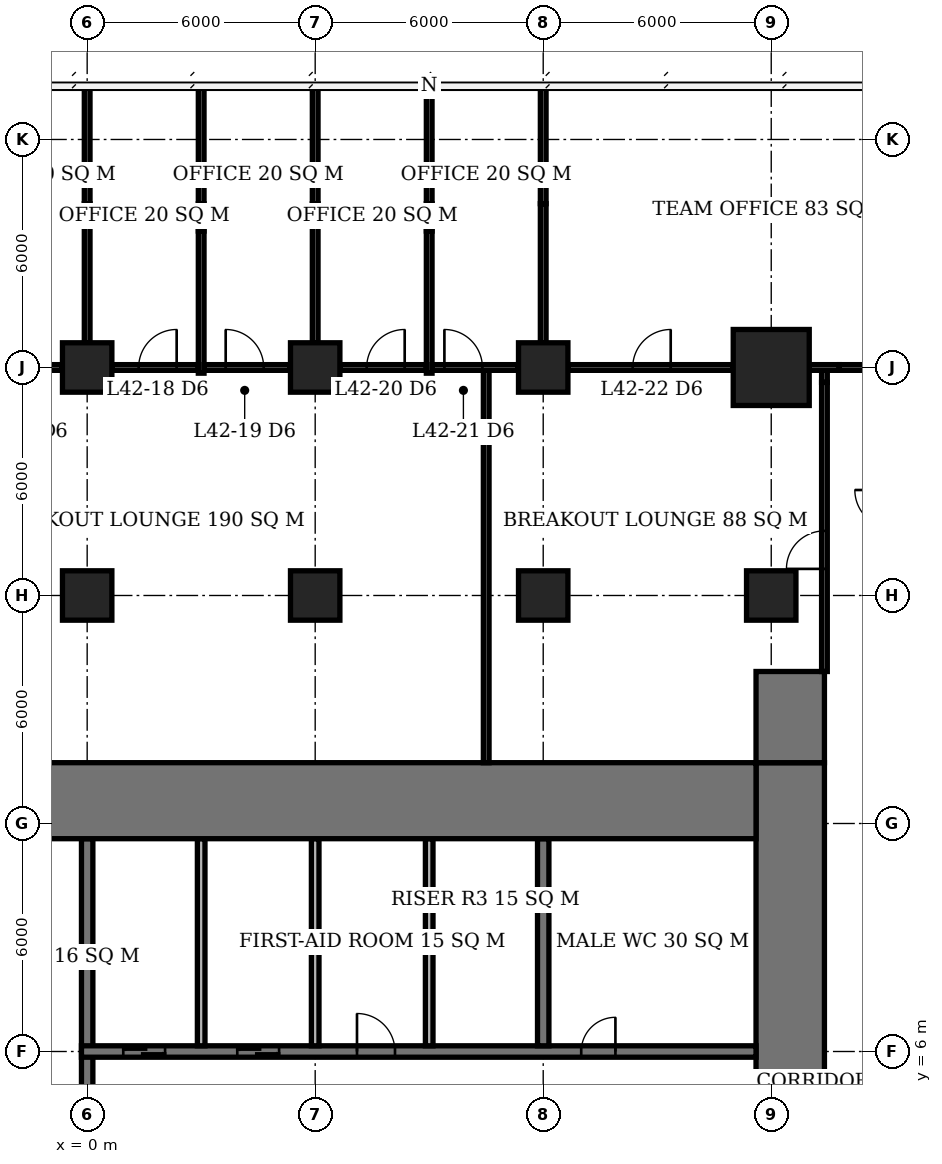
"""IFC4 building model, lengths in metres.
Left out: names, types, materials, properties, quantities, classifications, styles, units other than length and angle.
Written with IfcOpenShell. Run it as: python <this file> out.ifc"""

import sys

from ifc_helpers import new_model, si_unit, direction, frame, frame_2d, origin, origin_2d, place, context, subcontext, project, spatial, rectangle, extrude, element, fill, save


model = new_model("IFC4")
c1 = context("Model", 3, precision=1e-05, world=origin(), true_north=direction((0.0, 1.0)))
c2 = subcontext(c1, "Body", "Model", "MODEL_VIEW")
j1 = project(units=[si_unit("LENGTHUNIT", "METRE"), si_unit("PLANEANGLEUNIT", "RADIAN")], contexts=[c1])
p1 = place(None, origin())
s1 = spatial("IfcSite", under=j1, at=p1, CompositionType="ELEMENT")
p2 = place(p1, origin())
s2 = spatial("IfcBuilding", under=s1, at=p2, CompositionType="ELEMENT")
p3 = place(p2, frame((0.0, 0.0, 173.3)))
s3 = spatial("IfcBuildingStorey", under=s2, at=p3, CompositionType="ELEMENT", Elevation=173.3)
for number, where, z_axis, x_axis in (
    (1, (0.0, 18.0, 0.0), (0.0, 0.0, 1.0), (1.0, 0.0, 0.0)),
    (2, (0.0, 24.0, 0.0), (0.0, 0.0, 1.0), (1.0, 0.0, 0.0)),
    (3, (6.0, 18.0, 0.0), (0.0, 0.0, 1.0), (1.0, 0.0, 0.0)),
    (4, (6.0, 24.0, 0.0), (0.0, 0.0, 1.0), (1.0, 0.0, 0.0)),
    (5, (12.0, 18.0, 0.0), (0.0, 0.0, 1.0), (1.0, 0.0, 0.0)),
    (6, (12.0, 24.0, 0.0), (0.0, 0.0, 1.0), (1.0, 0.0, 0.0)),
    (7, (18.0, 18.0, 0.0), (0.0, 0.0, 1.0), (1.0, 0.0, 0.0)),
):
    element("IfcColumn", number, at=place(p3, frame(where, z_axis=z_axis, x_axis=x_axis)), inside=s3, PredefinedType="COLUMN", context=c2, shape_type="SweptSolid", body=[
        extrude(rectangle(XDim=1.3, YDim=1.3, at=origin_2d()), origin(), (0.0, 0.0, 1.0), 3.9),
    ])
p4 = place(p3, frame((18.0, 24.0, 0.0), z_axis=(0.0, 0.0, 1.0), x_axis=(1.0, 0.0, 0.0)))
e8 = element("IfcColumn", 8, at=p4, inside=s3, PredefinedType="COLUMN", context=c2, shape_type="SweptSolid", body=[
    extrude(rectangle(XDim=2.0, YDim=2.0, at=origin_2d()), origin(), (0.0, 0.0, 1.0), 3.9),
])
p5 = place(p3, frame((-5.6, 12.6, 0.0), z_axis=(0.0, 0.0, 1.0), x_axis=(1.0, 0.0, 0.0)))
e9 = element("IfcWall", 9, at=p5, inside=s3, PredefinedType="SHEAR", context=c2, shape_type="SweptSolid", body=[
    extrude(rectangle(XDim=23.2, YDim=2.0, at=frame_2d((11.6, 0.0))), origin(), (0.0, 0.0, 1.0), 3.9),
])
p6 = place(p3, frame((18.5, -7.6, 0.0), z_axis=(0.0, 0.0, 1.0), x_axis=(0.0, 1.0, 0.0)))
e10 = element("IfcWall", 10, at=p6, inside=s3, PredefinedType="SHEAR", context=c2, shape_type="SweptSolid", body=[
    extrude(rectangle(XDim=21.2, YDim=1.8, at=frame_2d((10.6, 0.0))), origin(), (0.0, 0.0, 1.0), 3.9),
])
p7 = place(p6, frame((9.2, 0.0, 0.0)))
e11 = element("IfcOpeningElement", 11, at=p7, cuts=e10, PredefinedType="OPENING", context=c2, shape_type="SweptSolid", body=[
    extrude(rectangle(XDim=1.8, YDim=2.4, at=frame_2d((0.9, 1.2))), frame((0.0, 0.91, 0.0), z_axis=(0.0, -1.0, 0.0), x_axis=(1.0, 0.0, 0.0)), (0.0, 0.0, 1.0), 1.82),
])
p8 = place(p3, frame((18.5, 13.6, 0.0), z_axis=(0.0, 0.0, 1.0), x_axis=(0.0, 1.0, 0.0)))
e12 = element("IfcWall", 12, at=p8, inside=s3, PredefinedType="SHEAR", context=c2, shape_type="SweptSolid", body=[
    extrude(rectangle(XDim=2.4, YDim=1.8, at=frame_2d((1.2, 0.0))), origin(), (0.0, 0.0, 1.0), 3.9),
])
p9 = place(p3, frame((-0.15, 6.0, 0.0), z_axis=(0.0, 0.0, 1.0), x_axis=(1.0, 0.0, 0.0)))
e13 = element("IfcWall", 13, at=p9, inside=s3, PredefinedType="SHEAR", context=c2, shape_type="SweptSolid", body=[
    extrude(rectangle(XDim=17.75, YDim=0.3, at=frame_2d((8.875, 0.0))), origin(), (0.0, 0.0, 1.0), 3.9),
])
p10 = place(p9, frame((13.15, 0.0, 0.0)))
e14 = element("IfcOpeningElement", 14, at=p10, cuts=e13, PredefinedType="OPENING", context=c2, shape_type="SweptSolid", body=[
    extrude(rectangle(XDim=0.9, YDim=2.1, at=frame_2d((0.45, 1.05))), frame((0.0, 0.16, 0.0), z_axis=(0.0, -1.0, 0.0), x_axis=(1.0, 0.0, 0.0)), (0.0, 0.0, 1.0), 0.32),
])
p11 = place(p9, frame((7.25, 0.0, 0.0)))
e15 = element("IfcOpeningElement", 15, at=p11, cuts=e13, PredefinedType="OPENING", context=c2, shape_type="SweptSolid", body=[
    extrude(rectangle(XDim=1.0, YDim=2.1, at=frame_2d((0.5, 1.05))), frame((0.0, 0.16, 0.0), z_axis=(0.0, -1.0, 0.0), x_axis=(1.0, 0.0, 0.0)), (0.0, 0.0, 1.0), 0.32),
])
p12 = place(p9, frame((1.1, 0.0, 0.0)))
e16 = element("IfcOpeningElement", 16, at=p12, cuts=e13, PredefinedType="OPENING", context=c2, shape_type="SweptSolid", body=[
    extrude(rectangle(XDim=1.1, YDim=2.1, at=frame_2d((0.55, 1.05))), frame((0.0, 0.16, 0.0), z_axis=(0.0, -1.0, 0.0), x_axis=(1.0, 0.0, 0.0)), (0.0, 0.0, 1.0), 0.32),
])
p13 = place(p9, frame((4.1, 0.0, 0.0)))
e17 = element("IfcOpeningElement", 17, at=p13, cuts=e13, PredefinedType="OPENING", context=c2, shape_type="SweptSolid", body=[
    extrude(rectangle(XDim=1.1, YDim=2.1, at=frame_2d((0.55, 1.05))), frame((0.0, 0.16, 0.0), z_axis=(0.0, -1.0, 0.0), x_axis=(1.0, 0.0, 0.0)), (0.0, 0.0, 1.0), 0.32),
])
p14 = place(p3, frame((0.0, 3.15, 0.0), z_axis=(0.0, 0.0, 1.0), x_axis=(0.0, 1.0, 0.0)))
e18 = element("IfcWall", 18, at=p14, inside=s3, PredefinedType="SHEAR", context=c2, shape_type="SweptSolid", body=[
    extrude(rectangle(XDim=8.45, YDim=0.3, at=frame_2d((4.225, 0.0))), origin(), (0.0, 0.0, 1.0), 3.9),
])
p15 = place(p3, frame((12.0, 6.15, 0.0), z_axis=(0.0, 0.0, 1.0), x_axis=(0.0, 1.0, 0.0)))
e19 = element("IfcWall", 19, at=p15, inside=s3, PredefinedType="SHEAR", context=c2, shape_type="SweptSolid", body=[
    extrude(rectangle(XDim=5.45, YDim=0.3, at=frame_2d((2.725, 0.0))), origin(), (0.0, 0.0, 1.0), 3.9),
])
for number, where, z_axis, x_axis in (
    (20, (3.0, 6.15, 0.0), (0.0, 0.0, 1.0), (0.0, 1.0, 0.0)),
    (21, (6.0, 6.15, 0.0), (0.0, 0.0, 1.0), (0.0, 1.0, 0.0)),
    (22, (9.0, 6.15, 0.0), (0.0, 0.0, 1.0), (0.0, 1.0, 0.0)),
):
    element("IfcWall", number, at=place(p3, frame(where, z_axis=z_axis, x_axis=x_axis)), inside=s3, PredefinedType="SOLIDWALL", context=c2, shape_type="SweptSolid", body=[
        extrude(rectangle(XDim=5.45, YDim=0.2, at=frame_2d((2.725, 0.0))), origin(), (0.0, 0.0, 1.0), 3.9),
    ])
p16 = place(p3, frame((-2.925, 24.0, 0.0), z_axis=(0.0, 0.0, 1.0), x_axis=(1.0, 0.0, 0.0)))
e23 = element("IfcWall", 23, at=p16, inside=s3, PredefinedType="PARTITIONING", context=c2, shape_type="SweptSolid", body=[
    extrude(rectangle(XDim=2.265, YDim=0.15, at=frame_2d((1.133, 0.0))), origin(), (0.0, 0.0, 1.0), 3.65),
])
p17 = place(p16, frame((0.57, 0.0, 0.0)))
e24 = element("IfcOpeningElement", 24, at=p17, cuts=e23, PredefinedType="OPENING", context=c2, shape_type="SweptSolid", body=[
    extrude(rectangle(XDim=1.0, YDim=2.1, at=frame_2d((0.5, 1.05))), frame((0.0, 0.085, 0.0), z_axis=(0.0, -1.0, 0.0), x_axis=(1.0, 0.0, 0.0)), (0.0, 0.0, 1.0), 0.17),
])
p18 = place(p3, frame((0.66, 24.0, 0.0), z_axis=(0.0, 0.0, 1.0), x_axis=(1.0, 0.0, 0.0)))
e25 = element("IfcWall", 25, at=p18, inside=s3, PredefinedType="PARTITIONING", context=c2, shape_type="SweptSolid", body=[
    extrude(rectangle(XDim=2.265, YDim=0.15, at=frame_2d((1.133, 0.0))), origin(), (0.0, 0.0, 1.0), 3.65),
])
p19 = place(p18, frame((0.695, 0.0, 0.0)))
e26 = element("IfcOpeningElement", 26, at=p19, cuts=e25, PredefinedType="OPENING", context=c2, shape_type="SweptSolid", body=[
    extrude(rectangle(XDim=1.0, YDim=2.1, at=frame_2d((0.5, 1.05))), frame((0.0, 0.085, 0.0), z_axis=(0.0, -1.0, 0.0), x_axis=(1.0, 0.0, 0.0)), (0.0, 0.0, 1.0), 0.17),
])
p20 = place(p3, frame((3.075, 24.0, 0.0), z_axis=(0.0, 0.0, 1.0), x_axis=(1.0, 0.0, 0.0)))
e27 = element("IfcWall", 27, at=p20, inside=s3, PredefinedType="PARTITIONING", context=c2, shape_type="SweptSolid", body=[
    extrude(rectangle(XDim=2.265, YDim=0.15, at=frame_2d((1.133, 0.0))), origin(), (0.0, 0.0, 1.0), 3.65),
])
p21 = place(p20, frame((0.57, 0.0, 0.0)))
e28 = element("IfcOpeningElement", 28, at=p21, cuts=e27, PredefinedType="OPENING", context=c2, shape_type="SweptSolid", body=[
    extrude(rectangle(XDim=1.0, YDim=2.1, at=frame_2d((0.5, 1.05))), frame((0.0, 0.085, 0.0), z_axis=(0.0, -1.0, 0.0), x_axis=(1.0, 0.0, 0.0)), (0.0, 0.0, 1.0), 0.17),
])
p22 = place(p3, frame((6.66, 24.0, 0.0), z_axis=(0.0, 0.0, 1.0), x_axis=(1.0, 0.0, 0.0)))
e29 = element("IfcWall", 29, at=p22, inside=s3, PredefinedType="PARTITIONING", context=c2, shape_type="SweptSolid", body=[
    extrude(rectangle(XDim=2.265, YDim=0.15, at=frame_2d((1.133, 0.0))), origin(), (0.0, 0.0, 1.0), 3.65),
])
p23 = place(p22, frame((0.695, 0.0, 0.0)))
e30 = element("IfcOpeningElement", 30, at=p23, cuts=e29, PredefinedType="OPENING", context=c2, shape_type="SweptSolid", body=[
    extrude(rectangle(XDim=1.0, YDim=2.1, at=frame_2d((0.5, 1.05))), frame((0.0, 0.085, 0.0), z_axis=(0.0, -1.0, 0.0), x_axis=(1.0, 0.0, 0.0)), (0.0, 0.0, 1.0), 0.17),
])
p24 = place(p3, frame((9.075, 24.0, 0.0), z_axis=(0.0, 0.0, 1.0), x_axis=(1.0, 0.0, 0.0)))
e31 = element("IfcWall", 31, at=p24, inside=s3, PredefinedType="PARTITIONING", context=c2, shape_type="SweptSolid", body=[
    extrude(rectangle(XDim=2.265, YDim=0.15, at=frame_2d((1.133, 0.0))), origin(), (0.0, 0.0, 1.0), 3.65),
])
p25 = place(p24, frame((0.325, 0.0, 0.0)))
e32 = element("IfcOpeningElement", 32, at=p25, cuts=e31, PredefinedType="OPENING", context=c2, shape_type="SweptSolid", body=[
    extrude(rectangle(XDim=1.0, YDim=2.1, at=frame_2d((0.5, 1.05))), frame((0.0, 0.085, 0.0), z_axis=(0.0, -1.0, 0.0), x_axis=(1.0, 0.0, 0.0)), (0.0, 0.0, 1.0), 0.17),
])
p26 = place(p3, frame((12.66, 24.0, 0.0), z_axis=(0.0, 0.0, 1.0), x_axis=(1.0, 0.0, 0.0)))
e33 = element("IfcWall", 33, at=p26, inside=s3, PredefinedType="PARTITIONING", context=c2, shape_type="SweptSolid", body=[
    extrude(rectangle(XDim=4.34, YDim=0.15, at=frame_2d((2.17, 0.0))), origin(), (0.0, 0.0, 1.0), 3.65),
])
p27 = place(p26, frame((1.695, 0.0, 0.0)))
e34 = element("IfcOpeningElement", 34, at=p27, cuts=e33, PredefinedType="OPENING", context=c2, shape_type="SweptSolid", body=[
    extrude(rectangle(XDim=1.0, YDim=2.1, at=frame_2d((0.5, 1.05))), frame((0.0, 0.085, 0.0), z_axis=(0.0, -1.0, 0.0), x_axis=(1.0, 0.0, 0.0)), (0.0, 0.0, 1.0), 0.17),
])
p28 = place(p3, frame((19.0, 24.0, 0.0), z_axis=(0.0, 0.0, 1.0), x_axis=(1.0, 0.0, 0.0)))
e35 = element("IfcWall", 35, at=p28, inside=s3, PredefinedType="PARTITIONING", context=c2, shape_type="SweptSolid", body=[
    extrude(rectangle(XDim=0.792, YDim=0.15, at=frame_2d((0.396, 0.0))), origin(), (0.0, 0.0, 1.0), 2.65),
])
p29 = place(p3, frame((19.792, 24.0, 0.0), z_axis=(0.0, 0.0, 1.0), x_axis=(1.0, 0.0, 0.0)))
e36 = element("IfcWall", 36, at=p29, inside=s3, PredefinedType="PARTITIONING", context=c2, shape_type="SweptSolid", body=[
    extrude(rectangle(XDim=4.283, YDim=0.15, at=frame_2d((2.142, 0.0))), origin(), (0.0, 0.0, 1.0), 3.65),
])
p30 = place(p3, frame((0.0, 24.65, 0.0), z_axis=(0.0, 0.0, 1.0), x_axis=(0.0, 1.0, 0.0)))
e37 = element("IfcWall", 37, at=p30, inside=s3, PredefinedType="PARTITIONING", context=c2, shape_type="SweptSolid", body=[
    extrude(rectangle(XDim=3.66, YDim=0.15, at=frame_2d((1.83, 0.0))), origin(), (0.0, 0.0, 1.0), 2.65),
])
p31 = place(p3, frame((0.0, 28.31, 0.0), z_axis=(0.0, 0.0, 1.0), x_axis=(0.0, 1.0, 0.0)))
e38 = element("IfcWall", 38, at=p31, inside=s3, PredefinedType="PARTITIONING", context=c2, shape_type="SweptSolid", body=[
    extrude(rectangle(XDim=3.09, YDim=0.15, at=frame_2d((1.545, 0.0))), origin(), (0.0, 0.0, 1.0), 3.65),
])
p32 = place(p3, frame((3.0, 23.85, 0.0), z_axis=(0.0, 0.0, 1.0), x_axis=(0.0, 1.0, 0.0)))
e39 = element("IfcWall", 39, at=p32, inside=s3, PredefinedType="PARTITIONING", context=c2, shape_type="SweptSolid", body=[
    extrude(rectangle(XDim=3.74, YDim=0.15, at=frame_2d((1.87, 0.0))), origin(), (0.0, 0.0, 1.0), 3.65),
])
p33 = place(p3, frame((3.0, 27.59, 0.0), z_axis=(0.0, 0.0, 1.0), x_axis=(0.0, 1.0, 0.0)))
e40 = element("IfcWall", 40, at=p33, inside=s3, PredefinedType="PARTITIONING", context=c2, shape_type="SweptSolid", body=[
    extrude(rectangle(XDim=0.72, YDim=0.15, at=frame_2d((0.36, 0.0))), origin(), (0.0, 0.0, 1.0), 2.65),
])
p34 = place(p3, frame((3.0, 28.31, 0.0), z_axis=(0.0, 0.0, 1.0), x_axis=(0.0, 1.0, 0.0)))
e41 = element("IfcWall", 41, at=p34, inside=s3, PredefinedType="PARTITIONING", context=c2, shape_type="SweptSolid", body=[
    extrude(rectangle(XDim=3.09, YDim=0.15, at=frame_2d((1.545, 0.0))), origin(), (0.0, 0.0, 1.0), 3.65),
])
p35 = place(p3, frame((6.0, 24.65, 0.0), z_axis=(0.0, 0.0, 1.0), x_axis=(0.0, 1.0, 0.0)))
e42 = element("IfcWall", 42, at=p35, inside=s3, PredefinedType="PARTITIONING", context=c2, shape_type="SweptSolid", body=[
    extrude(rectangle(XDim=3.66, YDim=0.15, at=frame_2d((1.83, 0.0))), origin(), (0.0, 0.0, 1.0), 2.65),
])
p36 = place(p3, frame((6.0, 28.31, 0.0), z_axis=(0.0, 0.0, 1.0), x_axis=(0.0, 1.0, 0.0)))
e43 = element("IfcWall", 43, at=p36, inside=s3, PredefinedType="PARTITIONING", context=c2, shape_type="SweptSolid", body=[
    extrude(rectangle(XDim=3.04, YDim=0.15, at=frame_2d((1.52, 0.0))), origin(), (0.0, 0.0, 1.0), 3.65),
])
p37 = place(p3, frame((9.0, 23.85, 0.0), z_axis=(0.0, 0.0, 1.0), x_axis=(0.0, 1.0, 0.0)))
e44 = element("IfcWall", 44, at=p37, inside=s3, PredefinedType="PARTITIONING", context=c2, shape_type="SweptSolid", body=[
    extrude(rectangle(XDim=3.74, YDim=0.15, at=frame_2d((1.87, 0.0))), origin(), (0.0, 0.0, 1.0), 3.65),
])
p38 = place(p3, frame((9.0, 27.59, 0.0), z_axis=(0.0, 0.0, 1.0), x_axis=(0.0, 1.0, 0.0)))
e45 = element("IfcWall", 45, at=p38, inside=s3, PredefinedType="PARTITIONING", context=c2, shape_type="SweptSolid", body=[
    extrude(rectangle(XDim=0.72, YDim=0.15, at=frame_2d((0.36, 0.0))), origin(), (0.0, 0.0, 1.0), 2.65),
])
p39 = place(p3, frame((9.0, 28.31, 0.0), z_axis=(0.0, 0.0, 1.0), x_axis=(0.0, 1.0, 0.0)))
e46 = element("IfcWall", 46, at=p39, inside=s3, PredefinedType="PARTITIONING", context=c2, shape_type="SweptSolid", body=[
    extrude(rectangle(XDim=3.04, YDim=0.15, at=frame_2d((1.52, 0.0))), origin(), (0.0, 0.0, 1.0), 3.65),
])
p40 = place(p3, frame((12.0, 24.65, 0.0), z_axis=(0.0, 0.0, 1.0), x_axis=(0.0, 1.0, 0.0)))
e47 = element("IfcWall", 47, at=p40, inside=s3, PredefinedType="PARTITIONING", context=c2, shape_type="SweptSolid", body=[
    extrude(rectangle(XDim=3.66, YDim=0.15, at=frame_2d((1.83, 0.0))), origin(), (0.0, 0.0, 1.0), 2.65),
])
p41 = place(p3, frame((12.0, 28.31, 0.0), z_axis=(0.0, 0.0, 1.0), x_axis=(0.0, 1.0, 0.0)))
e48 = element("IfcWall", 48, at=p41, inside=s3, PredefinedType="PARTITIONING", context=c2, shape_type="SweptSolid", body=[
    extrude(rectangle(XDim=3.04, YDim=0.15, at=frame_2d((1.52, 0.0))), origin(), (0.0, 0.0, 1.0), 3.65),
])
p42 = place(p3, frame((10.5, 13.6, 0.0), z_axis=(0.0, 0.0, 1.0), x_axis=(0.0, 1.0, 0.0)))
e49 = element("IfcWall", 49, at=p42, inside=s3, PredefinedType="PARTITIONING", context=c2, shape_type="SweptSolid", body=[
    extrude(rectangle(XDim=10.325, YDim=0.15, at=frame_2d((5.163, 0.0))), origin(), (0.0, 0.0, 1.0), 3.65),
])
p43 = place(p3, frame((19.4, 16.0, 0.0), z_axis=(0.0, 0.0, 1.0), x_axis=(0.0, 1.0, 0.0)))
e50 = element("IfcWall", 50, at=p43, inside=s3, PredefinedType="PARTITIONING", context=c2, shape_type="SweptSolid", body=[
    extrude(rectangle(XDim=7.608, YDim=0.15, at=frame_2d((3.804, 0.0))), origin(), (0.0, 0.0, 1.0), 3.65),
])
p44 = place(p43, frame((2.7, 0.0, 0.0)))
e51 = element("IfcOpeningElement", 51, at=p44, cuts=e50, PredefinedType="OPENING", context=c2, shape_type="SweptSolid", body=[
    extrude(rectangle(XDim=1.0, YDim=2.1, at=frame_2d((0.5, 1.05))), frame((0.0, 0.085, 0.0), z_axis=(0.0, -1.0, 0.0), x_axis=(1.0, 0.0, 0.0)), (0.0, 0.0, 1.0), 0.17),
])
p45 = place(p3, frame((19.4, 23.608, 0.0), z_axis=(0.0, 0.0, 1.0), x_axis=(0.0, 1.0, 0.0)))
e52 = element("IfcWall", 52, at=p45, inside=s3, PredefinedType="PARTITIONING", context=c2, shape_type="SweptSolid", body=[
    extrude(rectangle(XDim=0.317, YDim=0.15, at=frame_2d((0.159, 0.0))), origin(), (0.0, 0.0, 1.0), 2.65),
])
p46 = place(p10, origin())
e53 = element("IfcDoor", 53, at=p46, inside=s3, OperationType="SINGLE_SWING_RIGHT", PredefinedType="DOOR", context=c2, shape_type="SweptSolid", body=[
    extrude(rectangle(XDim=0.9, YDim=2.1, at=frame_2d((0.45, 1.05))), frame((0.0, 0.025, 0.0), z_axis=(0.0, -1.0, 0.0), x_axis=(1.0, 0.0, 0.0)), (0.0, 0.0, 1.0), 0.05),
])
fill(e14, e53)
p47 = place(p11, origin())
e54 = element("IfcDoor", 54, at=p47, inside=s3, OperationType="SINGLE_SWING_LEFT", PredefinedType="DOOR", context=c2, shape_type="SweptSolid", body=[
    extrude(rectangle(XDim=1.0, YDim=2.1, at=frame_2d((0.5, 1.05))), frame((0.0, 0.025, 0.0), z_axis=(0.0, -1.0, 0.0), x_axis=(1.0, 0.0, 0.0)), (0.0, 0.0, 1.0), 0.05),
])
fill(e15, e54)
p48 = place(p12, origin())
e55 = element("IfcDoor", 55, at=p48, inside=s3, OperationType="DOUBLE_DOOR_SLIDING", PredefinedType="USERDEFINED", context=c2, shape_type="SweptSolid", body=[
    extrude(rectangle(XDim=1.1, YDim=2.1, at=frame_2d((0.55, 1.05))), frame((0.0, 0.025, 0.0), z_axis=(0.0, -1.0, 0.0), x_axis=(1.0, 0.0, 0.0)), (0.0, 0.0, 1.0), 0.05),
])
fill(e16, e55)
p49 = place(p13, origin())
e56 = element("IfcDoor", 56, at=p49, inside=s3, OperationType="DOUBLE_DOOR_SLIDING", PredefinedType="USERDEFINED", context=c2, shape_type="SweptSolid", body=[
    extrude(rectangle(XDim=1.1, YDim=2.1, at=frame_2d((0.55, 1.05))), frame((0.0, 0.025, 0.0), z_axis=(0.0, -1.0, 0.0), x_axis=(1.0, 0.0, 0.0)), (0.0, 0.0, 1.0), 0.05),
])
fill(e17, e56)
p50 = place(p19, origin())
e57 = element("IfcDoor", 57, at=p50, inside=s3, OperationType="SINGLE_SWING_RIGHT", PredefinedType="DOOR", context=c2, shape_type="SweptSolid", body=[
    extrude(rectangle(XDim=1.0, YDim=2.1, at=frame_2d((0.5, 1.05))), frame((0.0, 0.025, 0.0), z_axis=(0.0, -1.0, 0.0), x_axis=(1.0, 0.0, 0.0)), (0.0, 0.0, 1.0), 0.05),
])
fill(e26, e57)
p51 = place(p21, origin())
e58 = element("IfcDoor", 58, at=p51, inside=s3, OperationType="SINGLE_SWING_LEFT", PredefinedType="DOOR", context=c2, shape_type="SweptSolid", body=[
    extrude(rectangle(XDim=1.0, YDim=2.1, at=frame_2d((0.5, 1.05))), frame((0.0, 0.025, 0.0), z_axis=(0.0, -1.0, 0.0), x_axis=(1.0, 0.0, 0.0)), (0.0, 0.0, 1.0), 0.05),
])
fill(e28, e58)
p52 = place(p23, origin())
e59 = element("IfcDoor", 59, at=p52, inside=s3, OperationType="SINGLE_SWING_RIGHT", PredefinedType="DOOR", context=c2, shape_type="SweptSolid", body=[
    extrude(rectangle(XDim=1.0, YDim=2.1, at=frame_2d((0.5, 1.05))), frame((0.0, 0.025, 0.0), z_axis=(0.0, -1.0, 0.0), x_axis=(1.0, 0.0, 0.0)), (0.0, 0.0, 1.0), 0.05),
])
fill(e30, e59)
p53 = place(p25, origin())
e60 = element("IfcDoor", 60, at=p53, inside=s3, OperationType="SINGLE_SWING_LEFT", PredefinedType="DOOR", context=c2, shape_type="SweptSolid", body=[
    extrude(rectangle(XDim=1.0, YDim=2.1, at=frame_2d((0.5, 1.05))), frame((0.0, 0.025, 0.0), z_axis=(0.0, -1.0, 0.0), x_axis=(1.0, 0.0, 0.0)), (0.0, 0.0, 1.0), 0.05),
])
fill(e32, e60)
p54 = place(p27, origin())
e61 = element("IfcDoor", 61, at=p54, inside=s3, OperationType="SINGLE_SWING_RIGHT", PredefinedType="DOOR", context=c2, shape_type="SweptSolid", body=[
    extrude(rectangle(XDim=1.0, YDim=2.1, at=frame_2d((0.5, 1.05))), frame((0.0, 0.025, 0.0), z_axis=(0.0, -1.0, 0.0), x_axis=(1.0, 0.0, 0.0)), (0.0, 0.0, 1.0), 0.05),
])
fill(e34, e61)
p55 = place(p44, origin())
e62 = element("IfcDoor", 62, at=p55, inside=s3, OperationType="SINGLE_SWING_LEFT", PredefinedType="DOOR", context=c2, shape_type="SweptSolid", body=[
    extrude(rectangle(XDim=1.0, YDim=2.1, at=frame_2d((0.5, 1.05))), frame((0.0, 0.025, 0.0), z_axis=(0.0, -1.0, 0.0), x_axis=(1.0, 0.0, 0.0)), (0.0, 0.0, 1.0), 0.05),
])
fill(e51, e62)
save(model, sys.argv[1])
